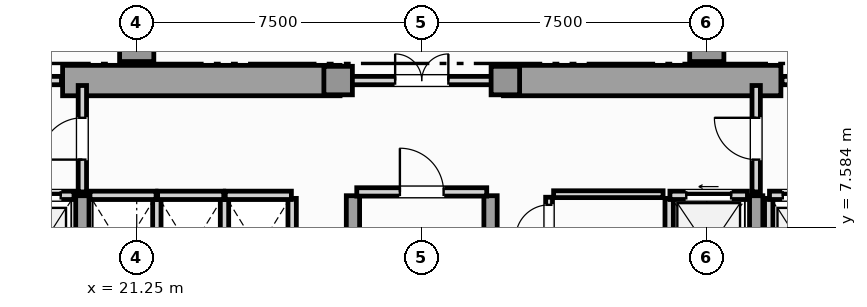
"""IFC4 building model, lengths in metres.
Left out: names, types, materials, properties, quantities, classifications, styles, units other than length and angle.
Written with IfcOpenShell. Run it as: python <this file> out.ifc"""

import sys

from ifc_helpers import new_model, si_unit, direction, frame, frame_2d, origin, origin_2d, place, context, subcontext, project, spatial, rectangle, extrude, element, fill, save


model = new_model("IFC4")
c1 = context("Model", 3, precision=1e-05, world=origin(), true_north=direction((0.0, 1.0)))
c2 = subcontext(c1, "Body", "Model", "MODEL_VIEW")
j1 = project(units=[si_unit("LENGTHUNIT", "METRE"), si_unit("PLANEANGLEUNIT", "RADIAN")], contexts=[c1])
p1 = place(None, origin())
s1 = spatial("IfcSite", under=j1, at=p1, CompositionType="ELEMENT")
p2 = place(p1, origin())
s2 = spatial("IfcBuilding", under=s1, at=p2, CompositionType="ELEMENT")
p3 = place(p2, frame((0.0, 0.0, 15.0)))
s3 = spatial("IfcBuildingStorey", under=s2, at=p3, CompositionType="ELEMENT", Elevation=15.0)
for number, where, z_axis, x_axis in (
    (1, (19.3, 11.45, 0.0), (0.0, 0.0, 1.0), (1.0, 0.0, 0.0)),
    (2, (30.9, 11.45, 0.0), (0.0, 0.0, 1.0), (1.0, 0.0, 0.0)),
):
    element("IfcWall", number, at=place(p3, frame(where, z_axis=z_axis, x_axis=x_axis)), inside=s3, PredefinedType="SHEAR", context=c2, shape_type="SweptSolid", body=[
        extrude(rectangle(XDim=7.3, YDim=0.8, at=frame_2d((3.65, 0.0))), origin(), (0.0, 0.0, 1.0), 4.5),
    ])
for number, where, z_axis, x_axis in (
    (3, (19.82, 0.92, 0.0), (0.0, 0.0, 1.0), (0.0, 1.0, 0.0)),
    (4, (26.94, 0.92, 0.0), (0.0, 0.0, 1.0), (0.0, 1.0, 0.0)),
    (5, (30.56, 0.92, 0.0), (0.0, 0.0, 1.0), (0.0, 1.0, 0.0)),
    (6, (37.55, 0.92, 0.0), (0.0, 0.0, 1.0), (0.0, 1.0, 0.0)),
):
    element("IfcWall", number, at=place(p3, frame(where, z_axis=z_axis, x_axis=x_axis)), inside=s3, PredefinedType="SHEAR", context=c2, shape_type="SweptSolid", body=[
        extrude(rectangle(XDim=7.5, YDim=0.35, at=frame_2d((3.75, 0.0))), origin(), (0.0, 0.0, 1.0), 4.5),
    ])
for number, where, z_axis, x_axis in (
    (7, (26.55, 11.45, 0.0), (0.0, 0.0, 1.0), (1.0, 0.0, 0.0)),
    (8, (30.95, 11.45, 0.0), (0.0, 0.0, 1.0), (1.0, 0.0, 0.0)),
):
    element("IfcColumn", number, at=place(p3, frame(where, z_axis=z_axis, x_axis=x_axis)), inside=s3, PredefinedType="COLUMN", context=c2, shape_type="SweptSolid", body=[
        extrude(rectangle(XDim=0.75, YDim=0.75, at=origin_2d()), origin(), (0.0, 0.0, 1.0), 4.8),
    ])
for number, where, z_axis, x_axis in (
    (9, (21.25, 12.4, 0.0), (0.0, 0.0, 1.0), (1.0, 0.0, 0.0)),
    (10, (36.25, 12.4, 0.0), (0.0, 0.0, 1.0), (1.0, 0.0, 0.0)),
):
    element("IfcColumn", number, at=place(p3, frame(where, z_axis=z_axis, x_axis=x_axis)), inside=s3, PredefinedType="COLUMN", context=c2, shape_type="SweptSolid", body=[
        extrude(rectangle(XDim=0.9, YDim=0.9, at=origin_2d()), origin(), (0.0, 0.0, 1.0), 4.8),
    ])
p4 = place(p3, frame((17.78, 8.43, 0.0), z_axis=(0.0, 0.0, 1.0), x_axis=(1.0, 0.0, 0.0)))
e11 = element("IfcWall", 11, at=p4, inside=s3, PredefinedType="SOLIDWALL", context=c2, shape_type="SweptSolid", body=[
    extrude(rectangle(XDim=1.82, YDim=0.22, at=frame_2d((0.91, 0.0))), origin(), (0.0, 0.0, 1.0), 4.5),
])
p5 = place(p4, frame((0.35, 0.0, 0.0)))
e12 = element("IfcOpeningElement", 12, at=p5, cuts=e11, PredefinedType="OPENING", context=c2, shape_type="SweptSolid", body=[
    extrude(rectangle(XDim=1.12, YDim=2.25, at=frame_2d((0.56, 1.125))), frame((0.0, 0.12, 0.0), z_axis=(0.0, -1.0, 0.0), x_axis=(1.0, 0.0, 0.0)), (0.0, 0.0, 1.0), 0.24),
])
p6 = place(p3, frame((37.88, 5.65, 0.0), z_axis=(0.0, 0.0, 1.0), x_axis=(0.0, 1.0, 0.0)))
e13 = element("IfcWall", 13, at=p6, inside=s3, PredefinedType="SOLIDWALL", context=c2, shape_type="SweptSolid", body=[
    extrude(rectangle(XDim=2.7, YDim=0.22, at=frame_2d((1.35, 0.0))), origin(), (0.0, 0.0, 1.0), 4.5),
])
p7 = place(p3, frame((37.9, 8.43, 0.0), z_axis=(0.0, 0.0, 1.0), x_axis=(1.0, 0.0, 0.0)))
e14 = element("IfcWall", 14, at=p7, inside=s3, PredefinedType="SOLIDWALL", context=c2, shape_type="SweptSolid", body=[
    extrude(rectangle(XDim=1.82, YDim=0.22, at=frame_2d((0.91, 0.0))), origin(), (0.0, 0.0, 1.0), 4.5),
])
p8 = place(p7, frame((0.35, 0.0, 0.0)))
e15 = element("IfcOpeningElement", 15, at=p8, cuts=e14, PredefinedType="OPENING", context=c2, shape_type="SweptSolid", body=[
    extrude(rectangle(XDim=1.12, YDim=2.25, at=frame_2d((0.56, 1.125))), frame((0.0, 0.12, 0.0), z_axis=(0.0, -1.0, 0.0), x_axis=(1.0, 0.0, 0.0)), (0.0, 0.0, 1.0), 0.24),
])
p9 = place(p3, frame((35.26, 5.65, 0.0), z_axis=(0.0, 0.0, 1.0), x_axis=(0.0, 1.0, 0.0)))
e16 = element("IfcWall", 16, at=p9, inside=s3, PredefinedType="SOLIDWALL", context=c2, shape_type="SweptSolid", body=[
    extrude(rectangle(XDim=2.7, YDim=0.22, at=frame_2d((1.35, 0.0))), origin(), (0.0, 0.0, 1.0), 4.5),
])
p10 = place(p3, frame((35.28, 8.43, 0.0), z_axis=(0.0, 0.0, 1.0), x_axis=(1.0, 0.0, 0.0)))
e17 = element("IfcWall", 17, at=p10, inside=s3, PredefinedType="SOLIDWALL", context=c2, shape_type="SweptSolid", body=[
    extrude(rectangle(XDim=2.04, YDim=0.22, at=frame_2d((1.02, 0.0))), origin(), (0.0, 0.0, 1.0), 4.5),
])
p11 = place(p10, frame((0.43, 0.0, 0.0)))
e18 = element("IfcOpeningElement", 18, at=p11, cuts=e17, PredefinedType="OPENING", context=c2, shape_type="SweptSolid", body=[
    extrude(rectangle(XDim=1.18, YDim=2.2, at=frame_2d((0.59, 1.1))), frame((0.0, 0.12, 0.0), z_axis=(0.0, -1.0, 0.0), x_axis=(1.0, 0.0, 0.0)), (0.0, 0.0, 1.0), 0.24),
])
p12 = place(p3, frame((21.78, 5.65, 0.0), z_axis=(0.0, 0.0, 1.0), x_axis=(0.0, 1.0, 0.0)))
e19 = element("IfcWall", 19, at=p12, inside=s3, PredefinedType="SOLIDWALL", context=c2, shape_type="SweptSolid", body=[
    extrude(rectangle(XDim=2.7, YDim=0.22, at=frame_2d((1.35, 0.0))), origin(), (0.0, 0.0, 1.0), 4.5),
])
p13 = place(p3, frame((20.02, 8.43, 0.0), z_axis=(0.0, 0.0, 1.0), x_axis=(1.0, 0.0, 0.0)))
e20 = element("IfcWall", 20, at=p13, inside=s3, PredefinedType="SOLIDWALL", context=c2, shape_type="SweptSolid", body=[
    extrude(rectangle(XDim=1.74, YDim=0.22, at=frame_2d((0.87, 0.0))), origin(), (0.0, 0.0, 1.0), 4.5),
])
p14 = place(p3, frame((23.56, 5.65, 0.0), z_axis=(0.0, 0.0, 1.0), x_axis=(0.0, 1.0, 0.0)))
e21 = element("IfcWall", 21, at=p14, inside=s3, PredefinedType="SOLIDWALL", context=c2, shape_type="SweptSolid", body=[
    extrude(rectangle(XDim=2.7, YDim=0.22, at=frame_2d((1.35, 0.0))), origin(), (0.0, 0.0, 1.0), 4.5),
])
p15 = place(p3, frame((21.8, 8.43, 0.0), z_axis=(0.0, 0.0, 1.0), x_axis=(1.0, 0.0, 0.0)))
e22 = element("IfcWall", 22, at=p15, inside=s3, PredefinedType="SOLIDWALL", context=c2, shape_type="SweptSolid", body=[
    extrude(rectangle(XDim=1.74, YDim=0.22, at=frame_2d((0.87, 0.0))), origin(), (0.0, 0.0, 1.0), 4.5),
])
p16 = place(p3, frame((25.34, 5.65, 0.0), z_axis=(0.0, 0.0, 1.0), x_axis=(0.0, 1.0, 0.0)))
e23 = element("IfcWall", 23, at=p16, inside=s3, PredefinedType="SOLIDWALL", context=c2, shape_type="SweptSolid", body=[
    extrude(rectangle(XDim=2.7, YDim=0.22, at=frame_2d((1.35, 0.0))), origin(), (0.0, 0.0, 1.0), 4.5),
])
p17 = place(p3, frame((23.58, 8.43, 0.0), z_axis=(0.0, 0.0, 1.0), x_axis=(1.0, 0.0, 0.0)))
e24 = element("IfcWall", 24, at=p17, inside=s3, PredefinedType="SOLIDWALL", context=c2, shape_type="SweptSolid", body=[
    extrude(rectangle(XDim=1.74, YDim=0.22, at=frame_2d((0.87, 0.0))), origin(), (0.0, 0.0, 1.0), 4.5),
])
p18 = place(p3, frame((27.04, 8.52, 0.0), z_axis=(0.0, 0.0, 1.0), x_axis=(1.0, 0.0, 0.0)))
e25 = element("IfcWall", 25, at=p18, inside=s3, PredefinedType="SOLIDWALL", context=c2, shape_type="SweptSolid", body=[
    extrude(rectangle(XDim=3.42, YDim=0.22, at=frame_2d((1.71, 0.0))), origin(), (0.0, 0.0, 1.0), 4.5),
])
p19 = place(p18, frame((1.135, 0.0, 0.0)))
e26 = element("IfcOpeningElement", 26, at=p19, cuts=e25, PredefinedType="OPENING", context=c2, shape_type="SweptSolid", body=[
    extrude(rectangle(XDim=1.15, YDim=2.2, at=frame_2d((0.575, 1.1))), frame((0.0, 0.12, 0.0), z_axis=(0.0, -1.0, 0.0), x_axis=(1.0, 0.0, 0.0)), (0.0, 0.0, 1.0), 0.24),
])
p20 = place(p3, frame((19.82, 8.52, 0.0), z_axis=(0.0, 0.0, 1.0), x_axis=(0.0, 1.0, 0.0)))
e27 = element("IfcWall", 27, at=p20, inside=s3, PredefinedType="SOLIDWALL", context=c2, shape_type="SweptSolid", body=[
    extrude(rectangle(XDim=2.8, YDim=0.22, at=frame_2d((1.4, 0.0))), origin(), (0.0, 0.0, 1.0), 3.956),
])
p21 = place(p20, frame((0.85, 0.0, 0.0)))
e28 = element("IfcOpeningElement", 28, at=p21, cuts=e27, PredefinedType="OPENING", context=c2, shape_type="SweptSolid", body=[
    extrude(rectangle(XDim=1.1, YDim=2.2, at=frame_2d((0.55, 1.1))), frame((0.0, 0.12, 0.0), z_axis=(0.0, -1.0, 0.0), x_axis=(1.0, 0.0, 0.0)), (0.0, 0.0, 1.0), 0.24),
])
p22 = place(p3, frame((37.55, 8.52, 0.0), z_axis=(0.0, 0.0, 1.0), x_axis=(0.0, 1.0, 0.0)))
e29 = element("IfcWall", 29, at=p22, inside=s3, PredefinedType="SOLIDWALL", context=c2, shape_type="SweptSolid", body=[
    extrude(rectangle(XDim=2.8, YDim=0.22, at=frame_2d((1.4, 0.0))), origin(), (0.0, 0.0, 1.0), 3.956),
])
p23 = place(p22, frame((0.85, 0.0, 0.0)))
e30 = element("IfcOpeningElement", 30, at=p23, cuts=e29, PredefinedType="OPENING", context=c2, shape_type="SweptSolid", body=[
    extrude(rectangle(XDim=1.1, YDim=2.2, at=frame_2d((0.55, 1.1))), frame((0.0, 0.12, 0.0), z_axis=(0.0, -1.0, 0.0), x_axis=(1.0, 0.0, 0.0)), (0.0, 0.0, 1.0), 0.24),
])
p24 = place(p3, frame((16.23, 11.45, 0.0), z_axis=(0.0, 0.0, 1.0), x_axis=(1.0, 0.0, 0.0)))
e31 = element("IfcWall", 31, at=p24, inside=s3, PredefinedType="SOLIDWALL", context=c2, shape_type="SweptSolid", body=[
    extrude(rectangle(XDim=3.04, YDim=0.22, at=frame_2d((1.52, 0.0))), origin(), (0.0, 0.0, 1.0), 4.5),
])
p25 = place(p24, frame((0.97, 0.0, 0.0)))
e32 = element("IfcOpeningElement", 32, at=p25, cuts=e31, PredefinedType="OPENING", context=c2, shape_type="SweptSolid", body=[
    extrude(rectangle(XDim=1.1, YDim=2.2, at=frame_2d((0.55, 1.1))), frame((0.0, 0.12, 0.0), z_axis=(0.0, -1.0, 0.0), x_axis=(1.0, 0.0, 0.0)), (0.0, 0.0, 1.0), 0.24),
])
p26 = place(p3, frame((26.63, 11.45, 0.0), z_axis=(0.0, 0.0, 1.0), x_axis=(1.0, 0.0, 0.0)))
e33 = element("IfcWall", 33, at=p26, inside=s3, PredefinedType="SOLIDWALL", context=c2, shape_type="SweptSolid", body=[
    extrude(rectangle(XDim=4.24, YDim=0.22, at=frame_2d((2.12, 0.0))), origin(), (0.0, 0.0, 1.0), 4.5),
])
p27 = place(p26, frame((1.42, 0.0, 0.0)))
e34 = element("IfcOpeningElement", 34, at=p27, cuts=e33, PredefinedType="OPENING", context=c2, shape_type="SweptSolid", body=[
    extrude(rectangle(XDim=1.4, YDim=2.2, at=frame_2d((0.7, 1.1))), frame((0.0, 0.12, 0.0), z_axis=(0.0, -1.0, 0.0), x_axis=(1.0, 0.0, 0.0)), (0.0, 0.0, 1.0), 0.24),
])
p28 = place(p3, frame((38.23, 11.45, 0.0), z_axis=(0.0, 0.0, 1.0), x_axis=(1.0, 0.0, 0.0)))
e35 = element("IfcWall", 35, at=p28, inside=s3, PredefinedType="SOLIDWALL", context=c2, shape_type="SweptSolid", body=[
    extrude(rectangle(XDim=3.04, YDim=0.22, at=frame_2d((1.52, 0.0))), origin(), (0.0, 0.0, 1.0), 4.5),
])
p29 = place(p28, frame((0.97, 0.0, 0.0)))
e36 = element("IfcOpeningElement", 36, at=p29, cuts=e35, PredefinedType="OPENING", context=c2, shape_type="SweptSolid", body=[
    extrude(rectangle(XDim=1.1, YDim=2.2, at=frame_2d((0.55, 1.1))), frame((0.0, 0.12, 0.0), z_axis=(0.0, -1.0, 0.0), x_axis=(1.0, 0.0, 0.0)), (0.0, 0.0, 1.0), 0.24),
])
p30 = place(p3, frame((32.1, 7.1, 0.0), z_axis=(0.0, 0.0, 1.0), x_axis=(0.0, 1.0, 0.0)))
e37 = element("IfcWall", 37, at=p30, inside=s3, PredefinedType="PARTITIONING", context=c2, shape_type="SweptSolid", body=[
    extrude(rectangle(XDim=1.28, YDim=0.18, at=frame_2d((0.64, 0.0))), origin(), (0.0, 0.0, 1.0), 4.5),
])
p31 = place(p30, frame((0.2, 0.0, 0.0)))
e38 = element("IfcOpeningElement", 38, at=p31, cuts=e37, PredefinedType="OPENING", context=c2, shape_type="SweptSolid", body=[
    extrude(rectangle(XDim=0.88, YDim=2.05, at=frame_2d((0.44, 1.025))), frame((0.0, 0.1, 0.0), z_axis=(0.0, -1.0, 0.0), x_axis=(1.0, 0.0, 0.0)), (0.0, 0.0, 1.0), 0.2),
])
p32 = place(p3, frame((32.22, 8.46, 0.0), z_axis=(0.0, 0.0, 1.0), x_axis=(1.0, 0.0, 0.0)))
e39 = element("IfcWall", 39, at=p32, inside=s3, PredefinedType="PARTITIONING", context=c2, shape_type="SweptSolid", body=[
    extrude(rectangle(XDim=2.88, YDim=0.18, at=frame_2d((1.44, 0.0))), origin(), (0.0, 0.0, 1.0), 4.5),
])
p33 = place(p5, origin())
e40 = element("IfcDoor", 40, at=p33, inside=s3, OperationType="SLIDING_TO_LEFT", PredefinedType="DOOR", context=c2, shape_type="SweptSolid", body=[
    extrude(rectangle(XDim=1.12, YDim=2.25, at=frame_2d((0.56, 1.125))), frame((0.0, 0.025, 0.0), z_axis=(0.0, -1.0, 0.0), x_axis=(1.0, 0.0, 0.0)), (0.0, 0.0, 1.0), 0.05),
])
fill(e12, e40)
p34 = place(p8, origin())
e41 = element("IfcDoor", 41, at=p34, inside=s3, OperationType="SLIDING_TO_RIGHT", PredefinedType="DOOR", context=c2, shape_type="SweptSolid", body=[
    extrude(rectangle(XDim=1.12, YDim=2.25, at=frame_2d((0.56, 1.125))), frame((0.0, 0.025, 0.0), z_axis=(0.0, -1.0, 0.0), x_axis=(1.0, 0.0, 0.0)), (0.0, 0.0, 1.0), 0.05),
])
fill(e15, e41)
p35 = place(p11, origin())
e42 = element("IfcDoor", 42, at=p35, inside=s3, OperationType="SLIDING_TO_LEFT", PredefinedType="DOOR", context=c2, shape_type="SweptSolid", body=[
    extrude(rectangle(XDim=1.18, YDim=2.2, at=frame_2d((0.59, 1.1))), frame((0.0, 0.025, 0.0), z_axis=(0.0, -1.0, 0.0), x_axis=(1.0, 0.0, 0.0)), (0.0, 0.0, 1.0), 0.05),
])
fill(e18, e42)
p36 = place(p19, origin())
e43 = element("IfcDoor", 43, at=p36, inside=s3, OperationType="SINGLE_SWING_LEFT", PredefinedType="DOOR", context=c2, shape_type="SweptSolid", body=[
    extrude(rectangle(XDim=1.15, YDim=2.2, at=frame_2d((0.575, 1.1))), frame((0.0, 0.025, 0.0), z_axis=(0.0, -1.0, 0.0), x_axis=(1.0, 0.0, 0.0)), (0.0, 0.0, 1.0), 0.05),
])
fill(e26, e43)
p37 = place(p21, origin())
e44 = element("IfcDoor", 44, at=p37, inside=s3, OperationType="SINGLE_SWING_LEFT", PredefinedType="DOOR", context=c2, shape_type="SweptSolid", body=[
    extrude(rectangle(XDim=1.1, YDim=2.2, at=frame_2d((0.55, 1.1))), frame((0.0, 0.025, 0.0), z_axis=(0.0, -1.0, 0.0), x_axis=(1.0, 0.0, 0.0)), (0.0, 0.0, 1.0), 0.05),
])
fill(e28, e44)
p38 = place(p23, origin())
e45 = element("IfcDoor", 45, at=p38, inside=s3, OperationType="SINGLE_SWING_RIGHT", PredefinedType="DOOR", context=c2, shape_type="SweptSolid", body=[
    extrude(rectangle(XDim=1.1, YDim=2.2, at=frame_2d((0.55, 1.1))), frame((0.0, 0.025, 0.0), z_axis=(0.0, -1.0, 0.0), x_axis=(1.0, 0.0, 0.0)), (0.0, 0.0, 1.0), 0.05),
])
fill(e30, e45)
p39 = place(p27, origin())
e46 = element("IfcDoor", 46, at=p39, inside=s3, OperationType="DOUBLE_DOOR_SINGLE_SWING", PredefinedType="DOOR", context=c2, shape_type="SweptSolid", body=[
    extrude(rectangle(XDim=1.4, YDim=2.2, at=frame_2d((0.7, 1.1))), frame((0.0, 0.025, 0.0), z_axis=(0.0, -1.0, 0.0), x_axis=(1.0, 0.0, 0.0)), (0.0, 0.0, 1.0), 0.05),
])
fill(e34, e46)
p40 = place(p31, origin())
e47 = element("IfcDoor", 47, at=p40, inside=s3, OperationType="SINGLE_SWING_LEFT", PredefinedType="DOOR", context=c2, shape_type="SweptSolid", body=[
    extrude(rectangle(XDim=0.88, YDim=2.05, at=frame_2d((0.44, 1.025))), frame((0.0, 0.025, 0.0), z_axis=(0.0, -1.0, 0.0), x_axis=(1.0, 0.0, 0.0)), (0.0, 0.0, 1.0), 0.05),
])
fill(e38, e47)
save(model, sys.argv[1])
